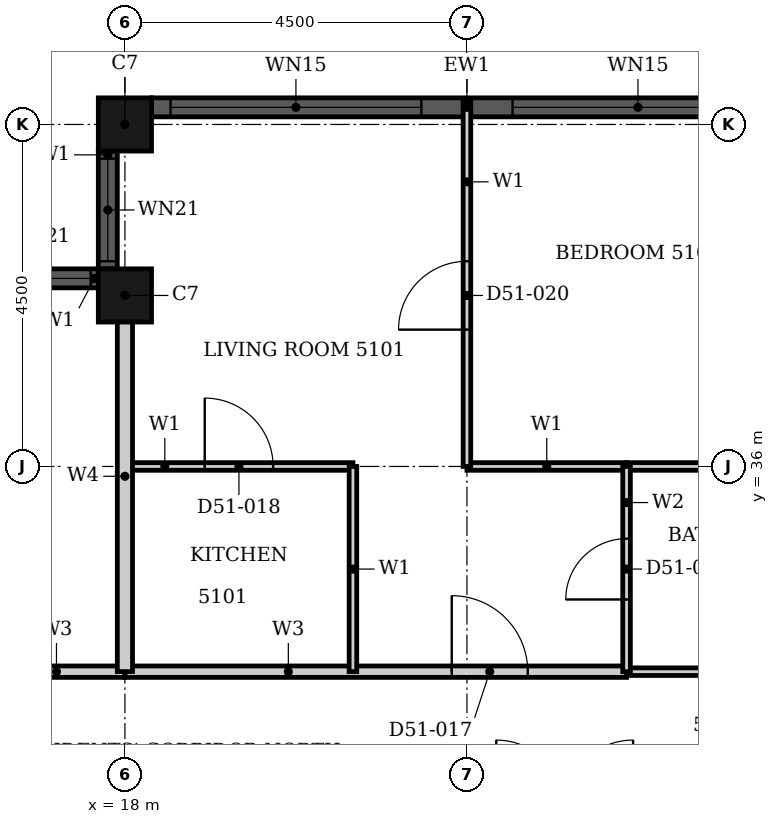
"""IFC4 building model, lengths in metres.
Left out: names, types, materials, properties, quantities, classifications, styles, units other than length and angle.
Written with IfcOpenShell. Run it as: python <this file> out.ifc"""

import sys

from ifc_helpers import new_model, si_unit, direction, frame, frame_2d, origin, origin_2d, place, context, subcontext, project, spatial, rectangle, hollow_rectangle, extrude, element, fill, save


model = new_model("IFC4")
c1 = context("Model", 3, precision=1e-05, world=origin(), true_north=direction((0.0, 1.0)))
c2 = subcontext(c1, "Body", "Model", "MODEL_VIEW")
j1 = project(units=[si_unit("LENGTHUNIT", "METRE"), si_unit("PLANEANGLEUNIT", "RADIAN")], contexts=[c1])
p1 = place(None, origin())
s1 = spatial("IfcSite", under=j1, at=p1, CompositionType="ELEMENT")
p2 = place(p1, origin())
s2 = spatial("IfcBuilding", under=s1, at=p2, CompositionType="ELEMENT")
p3 = place(p2, frame((0.0, 0.0, 203.5)))
s3 = spatial("IfcBuildingStorey", under=s2, at=p3, CompositionType="ELEMENT", Elevation=203.5)
for number, where, z_axis, x_axis in (
    (1, (18.0, 40.5, 0.0), (0.0, 0.0, 1.0), (1.0, 0.0, 0.0)),
    (2, (18.0, 38.25, 0.0), (0.0, 0.0, 1.0), (1.0, 0.0, 0.0)),
):
    element("IfcColumn", number, at=place(p3, frame(where, z_axis=z_axis, x_axis=x_axis)), inside=s3, PredefinedType="COLUMN", context=c2, shape_type="SweptSolid", body=[
        extrude(hollow_rectangle(XDim=0.7, YDim=0.7, WallThickness=0.022, at=origin_2d()), origin(), (0.0, 0.0, 1.0), 3.7),
    ])
p4 = place(p3, frame((26.65, 40.725, 0.0), z_axis=(0.0, 0.0, 1.0), x_axis=(-1.0, 0.0, 0.0)))
e3 = element("IfcWall", 3, at=p4, inside=s3, PredefinedType="SOLIDWALL", context=c2, shape_type="SweptSolid", body=[
    extrude(rectangle(XDim=8.3, YDim=0.25, at=frame_2d((4.15, 0.0))), origin(), (0.0, 0.0, 1.0), 3.7),
])
p5 = place(p4, frame((0.25, 0.0, 0.45)))
e4 = element("IfcOpeningElement", 4, at=p5, cuts=e3, PredefinedType="OPENING", context=c2, shape_type="SweptSolid", body=[
    extrude(rectangle(XDim=3.3, YDim=2.3, at=frame_2d((1.65, 1.15))), frame((0.0, 0.135, 0.0), z_axis=(0.0, -1.0, 0.0), x_axis=(1.0, 0.0, 0.0)), (0.0, 0.0, 1.0), 0.27),
])
p6 = place(p4, frame((4.75, 0.0, 0.45)))
e5 = element("IfcOpeningElement", 5, at=p6, cuts=e3, PredefinedType="OPENING", context=c2, shape_type="SweptSolid", body=[
    extrude(rectangle(XDim=3.3, YDim=2.3, at=frame_2d((1.65, 1.15))), frame((0.0, 0.135, 0.0), z_axis=(0.0, -1.0, 0.0), x_axis=(1.0, 0.0, 0.0)), (0.0, 0.0, 1.0), 0.27),
])
p7 = place(p3, frame((17.775, 40.15, 0.0), z_axis=(0.0, 0.0, 1.0), x_axis=(0.0, -1.0, 0.0)))
e6 = element("IfcWall", 6, at=p7, inside=s3, PredefinedType="SOLIDWALL", context=c2, shape_type="SweptSolid", body=[
    extrude(rectangle(XDim=1.55, YDim=0.25, at=frame_2d((0.775, 0.0))), origin(), (0.0, 0.0, 1.0), 3.7),
])
p8 = place(p7, frame((0.1, 0.0, 0.9)))
e7 = element("IfcOpeningElement", 7, at=p8, cuts=e6, PredefinedType="OPENING", context=c2, shape_type="SweptSolid", body=[
    extrude(rectangle(XDim=1.35, YDim=1.85, at=frame_2d((0.675, 0.925))), frame((0.0, 0.135, 0.0), z_axis=(0.0, -1.0, 0.0), x_axis=(1.0, 0.0, 0.0)), (0.0, 0.0, 1.0), 0.27),
])
p9 = place(p3, frame((17.65, 38.475, 0.0), z_axis=(0.0, 0.0, 1.0), x_axis=(-1.0, 0.0, 0.0)))
e8 = element("IfcWall", 8, at=p9, inside=s3, PredefinedType="SOLIDWALL", context=c2, shape_type="SweptSolid", body=[
    extrude(rectangle(XDim=1.55, YDim=0.25, at=frame_2d((0.775, 0.0))), origin(), (0.0, 0.0, 1.0), 3.7),
])
p10 = place(p9, frame((0.1, 0.0, 0.9)))
e9 = element("IfcOpeningElement", 9, at=p10, cuts=e8, PredefinedType="OPENING", context=c2, shape_type="SweptSolid", body=[
    extrude(rectangle(XDim=1.35, YDim=1.85, at=frame_2d((0.675, 0.925))), frame((0.0, 0.135, 0.0), z_axis=(0.0, -1.0, 0.0), x_axis=(1.0, 0.0, 0.0)), (0.0, 0.0, 1.0), 0.27),
])
p11 = place(p3, frame((18.0, 33.3, 0.0), z_axis=(0.0, 0.0, 1.0), x_axis=(1.0, 0.0, 0.0)))
e10 = element("IfcWall", 10, at=p11, inside=s3, PredefinedType="PARTITIONING", context=c2, shape_type="SweptSolid", body=[
    extrude(rectangle(XDim=6.6, YDim=0.15, at=frame_2d((3.3, 0.0))), origin(), (0.0, 0.0, 1.0), 3.4),
])
p12 = place(p11, frame((4.3, 0.0, 0.0)))
e11 = element("IfcOpeningElement", 11, at=p12, cuts=e10, PredefinedType="OPENING", context=c2, shape_type="SweptSolid", body=[
    extrude(rectangle(XDim=1.0, YDim=2.2, at=frame_2d((0.5, 1.1))), frame((0.0, 0.085, 0.0), z_axis=(0.0, -1.0, 0.0), x_axis=(1.0, 0.0, 0.0)), (0.0, 0.0, 1.0), 0.17),
])
p13 = place(p3, frame((16.2, 33.3, 0.0), z_axis=(0.0, 0.0, 1.0), x_axis=(1.0, 0.0, 0.0)))
e12 = element("IfcWall", 12, at=p13, inside=s3, PredefinedType="PARTITIONING", context=c2, shape_type="SweptSolid", body=[
    extrude(rectangle(XDim=1.799, YDim=0.15, at=frame_2d((0.899, 0.0))), origin(), (0.0, 0.0, 1.0), 3.4),
])
p14 = place(p3, frame((22.5, 36.0, 0.0), z_axis=(0.0, 0.0, 1.0), x_axis=(1.0, 0.0, 0.0)))
e13 = element("IfcWall", 13, at=p14, inside=s3, PredefinedType="PARTITIONING", context=c2, shape_type="SweptSolid", body=[
    extrude(rectangle(XDim=2.1, YDim=0.1, at=frame_2d((1.05, 0.0))), origin(), (0.0, 0.0, 1.0), 3.4),
])
p15 = place(p3, frame((18.0, 36.0, 0.0), z_axis=(0.0, 0.0, 1.0), x_axis=(1.0, 0.0, 0.0)))
e14 = element("IfcWall", 14, at=p15, inside=s3, PredefinedType="PARTITIONING", context=c2, shape_type="SweptSolid", body=[
    extrude(rectangle(XDim=3.0, YDim=0.1, at=frame_2d((1.5, 0.0))), origin(), (0.0, 0.0, 1.0), 3.4),
])
p16 = place(p15, frame((1.05, 0.0, 0.0)))
e15 = element("IfcOpeningElement", 15, at=p16, cuts=e14, PredefinedType="OPENING", context=c2, shape_type="SweptSolid", body=[
    extrude(rectangle(XDim=0.9, YDim=2.1, at=frame_2d((0.45, 1.05))), frame((0.0, 0.06, 0.0), z_axis=(0.0, -1.0, 0.0), x_axis=(1.0, 0.0, 0.0)), (0.0, 0.0, 1.0), 0.12),
])
p17 = place(p3, frame((21.0, 33.3, 0.0), z_axis=(0.0, 0.0, 1.0), x_axis=(0.0, 1.0, 0.0)))
e16 = element("IfcWall", 16, at=p17, inside=s3, PredefinedType="PARTITIONING", context=c2, shape_type="SweptSolid", body=[
    extrude(rectangle(XDim=2.7, YDim=0.1, at=frame_2d((1.35, 0.0))), origin(), (0.0, 0.0, 1.0), 3.4),
])
p18 = place(p3, frame((22.5, 36.0, 0.0), z_axis=(0.0, 0.0, 1.0), x_axis=(0.0, 1.0, 0.0)))
e17 = element("IfcWall", 17, at=p18, inside=s3, PredefinedType="PARTITIONING", context=c2, shape_type="SweptSolid", body=[
    extrude(rectangle(XDim=4.79, YDim=0.1, at=frame_2d((2.395, 0.0))), origin(), (0.0, 0.0, 1.0), 3.4),
])
p19 = place(p18, frame((1.8, 0.0, 0.0)))
e18 = element("IfcOpeningElement", 18, at=p19, cuts=e17, PredefinedType="OPENING", context=c2, shape_type="SweptSolid", body=[
    extrude(rectangle(XDim=0.9, YDim=2.1, at=frame_2d((0.45, 1.05))), frame((0.0, 0.06, 0.0), z_axis=(0.0, -1.0, 0.0), x_axis=(1.0, 0.0, 0.0)), (0.0, 0.0, 1.0), 0.12),
])
p20 = place(p3, frame((18.0, 33.301, 0.0), z_axis=(0.0, 0.0, 1.0), x_axis=(0.0, 1.0, 0.0)))
e19 = element("IfcWall", 19, at=p20, inside=s3, PredefinedType="PARTITIONING", context=c2, shape_type="SweptSolid", body=[
    extrude(rectangle(XDim=5.139, YDim=0.2, at=frame_2d((2.569, 0.0))), origin(), (0.0, 0.0, 1.0), 3.4),
])
for number, where, z_axis, x_axis in (
    (20, (24.6, 33.3, 0.0), (0.0, 0.0, 1.0), (1.0, 0.0, 0.0)),
    (21, (24.6, 36.0, 0.0), (0.0, 0.0, 1.0), (1.0, 0.0, 0.0)),
):
    element("IfcWall", number, at=place(p3, frame(where, z_axis=z_axis, x_axis=x_axis)), inside=s3, PredefinedType="PARTITIONING", context=c2, shape_type="SweptSolid", body=[
        extrude(rectangle(XDim=2.4, YDim=0.1, at=frame_2d((1.2, 0.0))), origin(), (0.0, 0.0, 1.0), 3.4),
    ])
p21 = place(p3, frame((24.6, 33.3, 0.0), z_axis=(0.0, 0.0, 1.0), x_axis=(0.0, 1.0, 0.0)))
e22 = element("IfcWall", 22, at=p21, inside=s3, PredefinedType="PARTITIONING", context=c2, shape_type="SweptSolid", body=[
    extrude(rectangle(XDim=2.7, YDim=0.1, at=frame_2d((1.35, 0.0))), origin(), (0.0, 0.0, 1.0), 3.4),
])
p22 = place(p21, frame((0.95, 0.0, 0.0)))
e23 = element("IfcOpeningElement", 23, at=p22, cuts=e22, PredefinedType="OPENING", context=c2, shape_type="SweptSolid", body=[
    extrude(rectangle(XDim=0.8, YDim=2.1, at=frame_2d((0.4, 1.05))), frame((0.0, 0.06, 0.0), z_axis=(0.0, -1.0, 0.0), x_axis=(1.0, 0.0, 0.0)), (0.0, 0.0, 1.0), 0.12),
])
p23 = place(p5, origin())
e24 = element("IfcWindow", 24, at=p23, inside=s3, PartitioningType="SINGLE_PANEL", PredefinedType="WINDOW", context=c2, shape_type="SweptSolid", body=[
    extrude(rectangle(XDim=3.3, YDim=2.3, at=frame_2d((1.65, 1.15))), frame((0.0, 0.03, 0.0), z_axis=(0.0, -1.0, 0.0), x_axis=(1.0, 0.0, 0.0)), (0.0, 0.0, 1.0), 0.06),
])
fill(e4, e24)
p24 = place(p6, origin())
e25 = element("IfcWindow", 25, at=p24, inside=s3, PartitioningType="SINGLE_PANEL", PredefinedType="WINDOW", context=c2, shape_type="SweptSolid", body=[
    extrude(rectangle(XDim=3.3, YDim=2.3, at=frame_2d((1.65, 1.15))), frame((0.0, 0.03, 0.0), z_axis=(0.0, -1.0, 0.0), x_axis=(1.0, 0.0, 0.0)), (0.0, 0.0, 1.0), 0.06),
])
fill(e5, e25)
p25 = place(p8, origin())
e26 = element("IfcWindow", 26, at=p25, inside=s3, PartitioningType="SINGLE_PANEL", PredefinedType="WINDOW", context=c2, shape_type="SweptSolid", body=[
    extrude(rectangle(XDim=1.35, YDim=1.85, at=frame_2d((0.675, 0.925))), frame((0.0, 0.03, 0.0), z_axis=(0.0, -1.0, 0.0), x_axis=(1.0, 0.0, 0.0)), (0.0, 0.0, 1.0), 0.06),
])
fill(e7, e26)
p26 = place(p10, origin())
e27 = element("IfcWindow", 27, at=p26, inside=s3, PartitioningType="SINGLE_PANEL", PredefinedType="WINDOW", context=c2, shape_type="SweptSolid", body=[
    extrude(rectangle(XDim=1.35, YDim=1.85, at=frame_2d((0.675, 0.925))), frame((0.0, 0.03, 0.0), z_axis=(0.0, -1.0, 0.0), x_axis=(1.0, 0.0, 0.0)), (0.0, 0.0, 1.0), 0.06),
])
fill(e9, e27)
p27 = place(p12, origin())
e28 = element("IfcDoor", 28, at=p27, inside=s3, OperationType="SINGLE_SWING_LEFT", PredefinedType="DOOR", context=c2, shape_type="SweptSolid", body=[
    extrude(rectangle(XDim=1.0, YDim=2.2, at=frame_2d((0.5, 1.1))), frame((0.0, 0.025, 0.0), z_axis=(0.0, -1.0, 0.0), x_axis=(1.0, 0.0, 0.0)), (0.0, 0.0, 1.0), 0.05),
])
fill(e11, e28)
p28 = place(p16, origin())
e29 = element("IfcDoor", 29, at=p28, inside=s3, OperationType="SINGLE_SWING_LEFT", PredefinedType="DOOR", context=c2, shape_type="SweptSolid", body=[
    extrude(rectangle(XDim=0.9, YDim=2.1, at=frame_2d((0.45, 1.05))), frame((0.0, 0.025, 0.0), z_axis=(0.0, -1.0, 0.0), x_axis=(1.0, 0.0, 0.0)), (0.0, 0.0, 1.0), 0.05),
])
fill(e15, e29)
p29 = place(p22, origin())
e30 = element("IfcDoor", 30, at=p29, inside=s3, OperationType="SINGLE_SWING_LEFT", PredefinedType="DOOR", context=c2, shape_type="SweptSolid", body=[
    extrude(rectangle(XDim=0.8, YDim=2.1, at=frame_2d((0.4, 1.05))), frame((0.0, 0.025, 0.0), z_axis=(0.0, -1.0, 0.0), x_axis=(1.0, 0.0, 0.0)), (0.0, 0.0, 1.0), 0.05),
])
fill(e23, e30)
p30 = place(p19, origin())
e31 = element("IfcDoor", 31, at=p30, inside=s3, OperationType="SINGLE_SWING_RIGHT", PredefinedType="DOOR", context=c2, shape_type="SweptSolid", body=[
    extrude(rectangle(XDim=0.9, YDim=2.1, at=frame_2d((0.45, 1.05))), frame((0.0, 0.025, 0.0), z_axis=(0.0, -1.0, 0.0), x_axis=(1.0, 0.0, 0.0)), (0.0, 0.0, 1.0), 0.05),
])
fill(e18, e31)
save(model, sys.argv[1])
